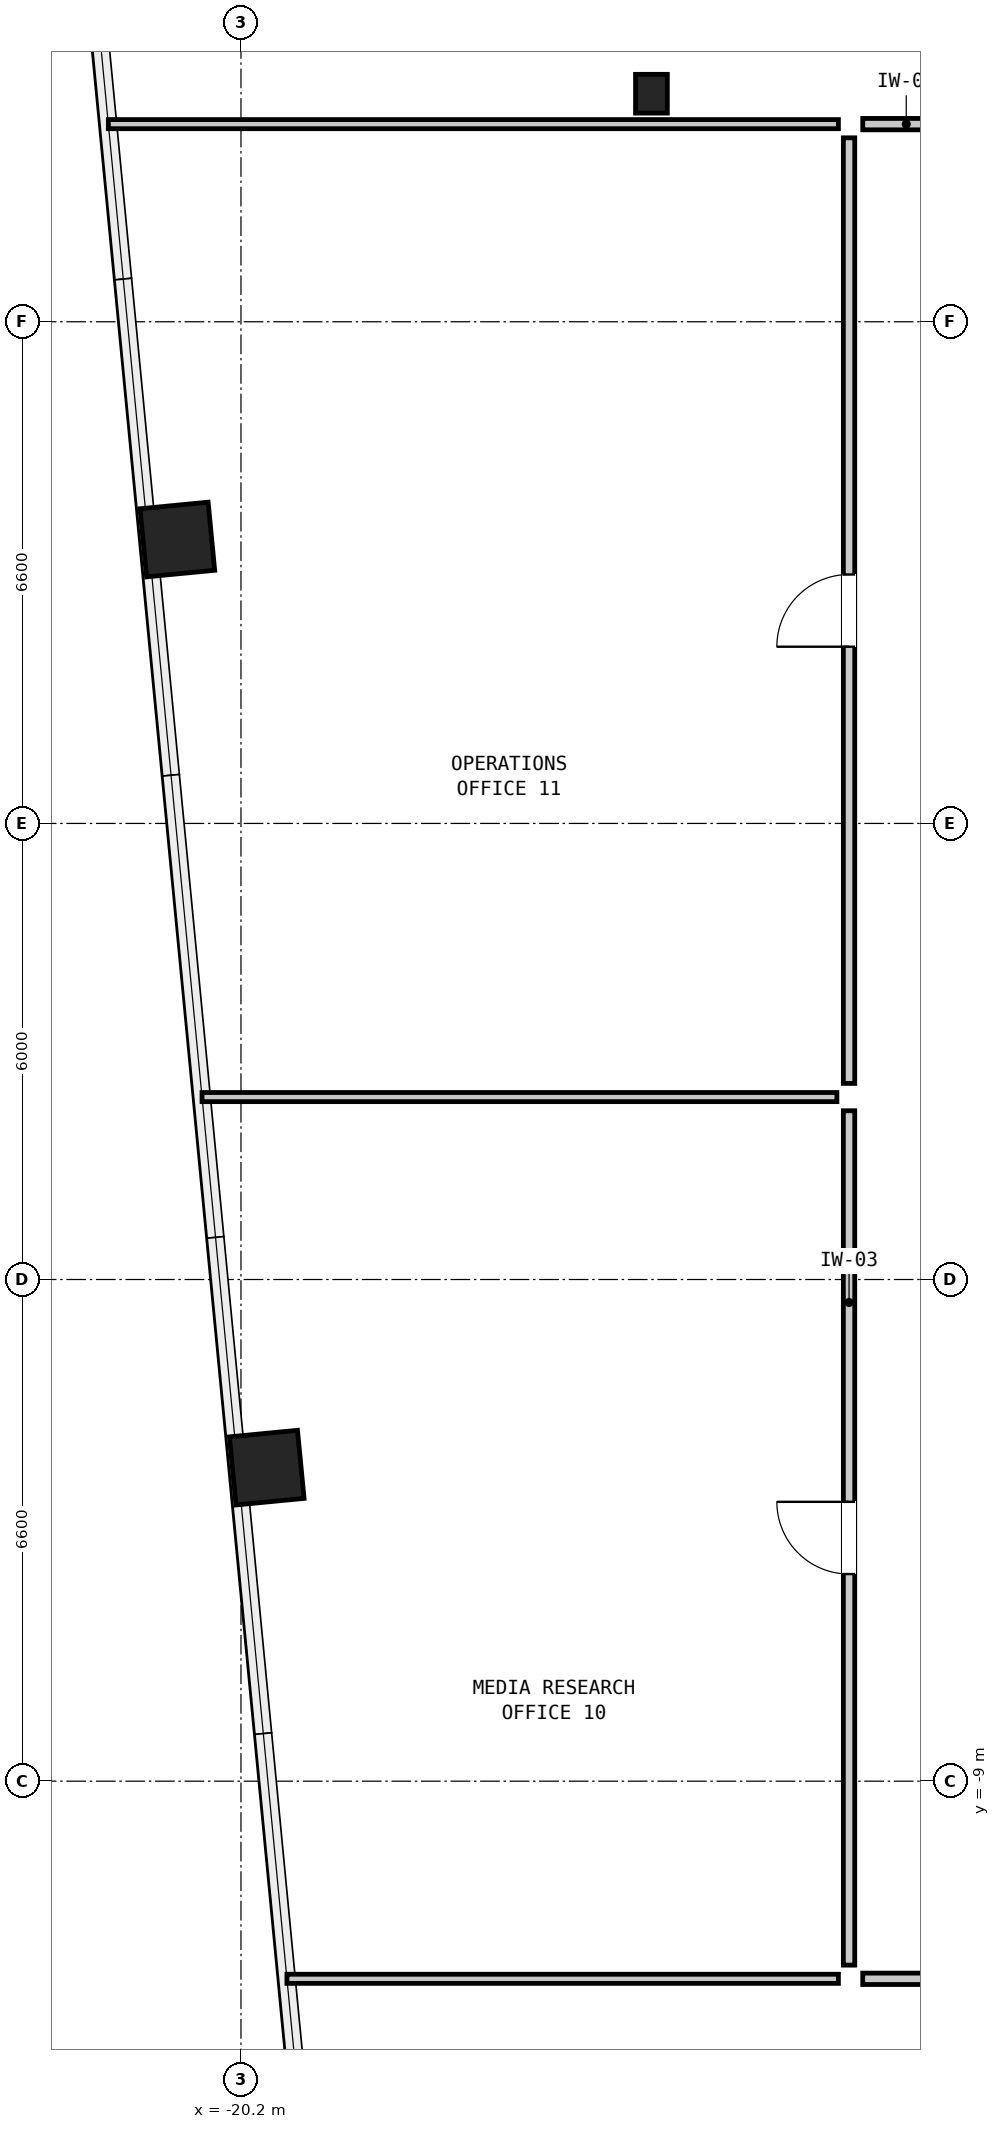
"""IFC4 building model, lengths in metres.
Left out: names, types, materials, properties, quantities, classifications, styles, units other than length and angle.
Written with IfcOpenShell. Run it as: python <this file> out.ifc"""

import sys

from ifc_helpers import new_model, si_unit, direction, frame, frame_2d, origin, origin_2d, place, context, subcontext, project, spatial, rectangle, hollow_rectangle, i_section, extrude, element, fill, save


model = new_model("IFC4")
c1 = context("Model", 3, precision=1e-05, world=origin(), true_north=direction((0.0, 1.0)))
c2 = subcontext(c1, "Body", "Model", "MODEL_VIEW")
j1 = project(units=[si_unit("LENGTHUNIT", "METRE"), si_unit("PLANEANGLEUNIT", "RADIAN")], contexts=[c1])
p1 = place(None, origin())
s1 = spatial("IfcSite", under=j1, at=p1, CompositionType="ELEMENT")
p2 = place(p1, origin())
s2 = spatial("IfcBuilding", under=s1, at=p2, CompositionType="ELEMENT")
p3 = place(p2, frame((0.0, 0.0, 78.6)))
s3 = spatial("IfcBuildingStorey", under=s2, at=p3, CompositionType="ELEMENT", Elevation=78.6)
for number, where, z_axis, x_axis in (
    (1, (-21.037, 7.335, 0.0), (0.0, 0.0, 1.0), (-0.096, 0.995, 0.0)),
    (2, (-19.861, -4.875, 0.0), (0.0, 0.0, 1.0), (-0.096, 0.995, 0.0)),
):
    element("IfcColumn", number, at=place(p3, frame(where, z_axis=z_axis, x_axis=x_axis)), inside=s3, PredefinedType="COLUMN", context=c2, shape_type="SweptSolid", body=[
        extrude(hollow_rectangle(XDim=0.9, YDim=0.9, WallThickness=0.055, at=origin_2d()), origin(), (0.0, 0.0, 1.0), 3.05),
    ])
p4 = place(p3, frame((-14.8, 13.2, 0.0), z_axis=(0.0, 0.0, 1.0), x_axis=(1.0, 0.0, 0.0)))
e3 = element("IfcColumn", 3, at=p4, inside=s3, PredefinedType="COLUMN", context=c2, shape_type="SweptSolid", body=[
    extrude(i_section(OverallWidth=0.418, OverallDepth=0.51, WebThickness=0.042, FlangeThickness=0.068, at=origin_2d()), origin(), (0.0, 0.0, 1.0), 3.05),
])
p5 = place(p3, frame((-21.945, 12.8, 0.0), z_axis=(0.0, 0.0, 1.0), x_axis=(1.0, 0.0, 0.0)))
e4 = element("IfcWall", 4, at=p5, inside=s3, PredefinedType="PARTITIONING", context=c2, shape_type="SweptSolid", body=[
    extrude(rectangle(XDim=9.605, YDim=0.12, at=frame_2d((4.802, 0.0))), origin(), (0.0, 0.0, 1.0), 2.83),
])
p6 = place(p3, frame((-19.595, -11.6, 0.0), z_axis=(0.0, 0.0, 1.0), x_axis=(1.0, 0.0, 0.0)))
e5 = element("IfcWall", 5, at=p6, inside=s3, PredefinedType="PARTITIONING", context=c2, shape_type="SweptSolid", body=[
    extrude(rectangle(XDim=7.255, YDim=0.12, at=frame_2d((3.628, 0.0))), origin(), (0.0, 0.0, 1.0), 2.274),
])
p7 = place(p3, frame((-20.712, 0.0, 0.0), z_axis=(0.0, 0.0, 1.0), x_axis=(1.0, 0.0, 0.0)))
e6 = element("IfcWall", 6, at=p7, inside=s3, PredefinedType="PARTITIONING", context=c2, shape_type="SweptSolid", body=[
    extrude(rectangle(XDim=8.352, YDim=0.12, at=frame_2d((4.176, 0.0))), origin(), (0.0, 0.0, 1.0), 2.83),
])
p8 = place(p3, frame((-12.02, 12.8, 0.0), z_axis=(0.0, 0.0, 1.0), x_axis=(1.0, 0.0, 0.0)))
e7 = element("IfcWall", 7, at=p8, inside=s3, PredefinedType="PARTITIONING", context=c2, shape_type="SweptSolid", body=[
    extrude(rectangle(XDim=3.44, YDim=0.15, at=frame_2d((1.72, 0.0))), origin(), (0.0, 0.0, 1.0), 2.83),
])
p9 = place(p8, frame((1.245, 0.0, 0.0)))
e8 = element("IfcOpeningElement", 8, at=p9, cuts=e7, PredefinedType="OPENING", context=c2, shape_type="SweptSolid", body=[
    extrude(rectangle(XDim=0.95, YDim=2.1, at=frame_2d((0.475, 1.05))), frame((0.0, 0.087, 0.0), z_axis=(0.0, -1.0, 0.0), x_axis=(1.0, 0.0, 0.0)), (0.0, 0.0, 1.0), 0.174),
])
p10 = place(p3, frame((-12.02, -11.6, 0.0), z_axis=(0.0, 0.0, 1.0), x_axis=(1.0, 0.0, 0.0)))
e9 = element("IfcWall", 9, at=p10, inside=s3, PredefinedType="PARTITIONING", context=c2, shape_type="SweptSolid", body=[
    extrude(rectangle(XDim=4.04, YDim=0.15, at=frame_2d((2.02, 0.0))), origin(), (0.0, 0.0, 1.0), 2.274),
])
p11 = place(p10, frame((1.345, 0.0, 0.0)))
e10 = element("IfcOpeningElement", 10, at=p11, cuts=e9, PredefinedType="OPENING", context=c2, shape_type="SweptSolid", body=[
    extrude(rectangle(XDim=0.95, YDim=2.1, at=frame_2d((0.475, 1.05))), frame((0.0, 0.087, 0.0), z_axis=(0.0, -1.0, 0.0), x_axis=(1.0, 0.0, 0.0)), (0.0, 0.0, 1.0), 0.174),
])
p12 = place(p3, frame((-12.2, -11.42, 0.0), z_axis=(0.0, 0.0, 1.0), x_axis=(0.0, 1.0, 0.0)))
e11 = element("IfcWall", 11, at=p12, inside=s3, PredefinedType="PARTITIONING", context=c2, shape_type="SweptSolid", body=[
    extrude(rectangle(XDim=11.24, YDim=0.15, at=frame_2d((5.62, 0.0))), origin(), (0.0, 0.0, 1.0), 2.83),
])
p13 = place(p12, frame((5.145, 0.0, 0.0)))
e12 = element("IfcOpeningElement", 12, at=p13, cuts=e11, PredefinedType="OPENING", context=c2, shape_type="SweptSolid", body=[
    extrude(rectangle(XDim=0.95, YDim=2.1, at=frame_2d((0.475, 1.05))), frame((0.0, 0.087, 0.0), z_axis=(0.0, -1.0, 0.0), x_axis=(1.0, 0.0, 0.0)), (0.0, 0.0, 1.0), 0.174),
])
p14 = place(p3, frame((-12.2, 0.18, 0.0), z_axis=(0.0, 0.0, 1.0), x_axis=(0.0, 1.0, 0.0)))
e13 = element("IfcWall", 13, at=p14, inside=s3, PredefinedType="PARTITIONING", context=c2, shape_type="SweptSolid", body=[
    extrude(rectangle(XDim=12.44, YDim=0.15, at=frame_2d((6.22, 0.0))), origin(), (0.0, 0.0, 1.0), 2.83),
])
p15 = place(p14, frame((5.745, 0.0, 0.0)))
e14 = element("IfcOpeningElement", 14, at=p15, cuts=e13, PredefinedType="OPENING", context=c2, shape_type="SweptSolid", body=[
    extrude(rectangle(XDim=0.95, YDim=2.1, at=frame_2d((0.475, 1.05))), frame((0.0, 0.087, 0.0), z_axis=(0.0, -1.0, 0.0), x_axis=(1.0, 0.0, 0.0)), (0.0, 0.0, 1.0), 0.174),
])
p16 = place(p13, origin())
e15 = element("IfcDoor", 15, at=p16, inside=s3, OperationType="SINGLE_SWING_RIGHT", PredefinedType="DOOR", context=c2, shape_type="SweptSolid", body=[
    extrude(rectangle(XDim=0.95, YDim=2.1, at=frame_2d((0.475, 1.05))), frame((0.0, 0.025, 0.0), z_axis=(0.0, -1.0, 0.0), x_axis=(1.0, 0.0, 0.0)), (0.0, 0.0, 1.0), 0.05),
])
fill(e12, e15)
p17 = place(p15, origin())
e16 = element("IfcDoor", 16, at=p17, inside=s3, OperationType="SINGLE_SWING_LEFT", PredefinedType="DOOR", context=c2, shape_type="SweptSolid", body=[
    extrude(rectangle(XDim=0.95, YDim=2.1, at=frame_2d((0.475, 1.05))), frame((0.0, 0.025, 0.0), z_axis=(0.0, -1.0, 0.0), x_axis=(1.0, 0.0, 0.0)), (0.0, 0.0, 1.0), 0.05),
])
fill(e14, e16)
save(model, sys.argv[1])
